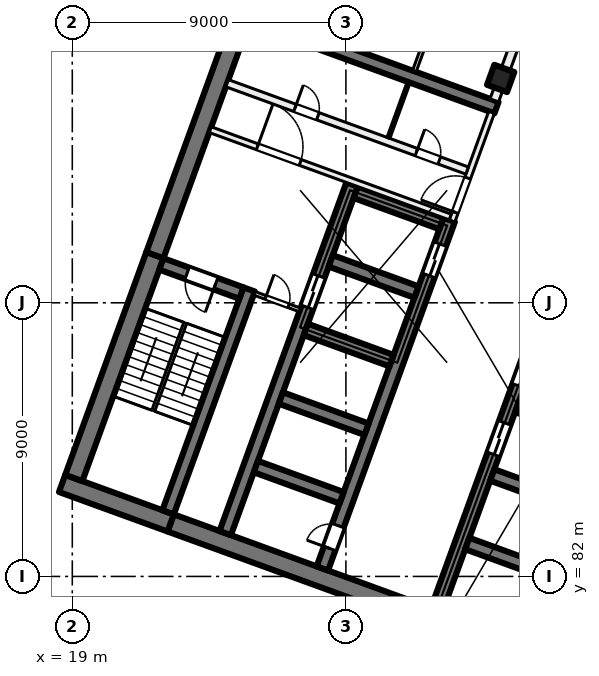
"""IFC4 building model, lengths in metres.
Left out: names, types, materials, properties, quantities, classifications, styles, units other than length and angle.
Written with IfcOpenShell. Run it as: python <this file> out.ifc"""

import sys

from ifc_helpers import new_model, si_unit, direction, frame, frame_2d, origin, origin_2d, place, context, subcontext, project, spatial, rectangle, extrude, element, fill, save


model = new_model("IFC4")
c1 = context("Model", 3, precision=1e-05, world=origin(), true_north=direction((0.0, 1.0)))
c2 = subcontext(c1, "Body", "Model", "MODEL_VIEW")
j1 = project(units=[si_unit("LENGTHUNIT", "METRE"), si_unit("PLANEANGLEUNIT", "RADIAN")], contexts=[c1])
p1 = place(None, origin())
s1 = spatial("IfcSite", under=j1, at=p1, CompositionType="ELEMENT")
p2 = place(p1, origin())
s2 = spatial("IfcBuilding", under=s1, at=p2, CompositionType="ELEMENT")
p3 = place(p2, frame((0.0, 0.0, 27.5)))
s3 = spatial("IfcBuildingStorey", under=s2, at=p3, CompositionType="ELEMENT", Elevation=27.5)
p4 = place(p3, frame((33.091, 98.379, 0.0), z_axis=(0.0, 0.0, 1.0), x_axis=(-0.342020143326, -0.939692620786, 0.0)))
e1 = element("IfcColumn", 1, at=p4, inside=s3, PredefinedType="COLUMN", context=c2, shape_type="SweptSolid", body=[
    extrude(rectangle(XDim=0.7, YDim=0.7, at=origin_2d()), origin(), (0.0, 0.0, 1.0), 4.0),
])
p5 = place(p3, frame((35.767, 78.835, 0.0), z_axis=(0.0, 0.0, 1.0), x_axis=(-0.939692894512, 0.342019391267, 0.0)))
e2 = element("IfcWall", 2, at=p5, inside=s3, PredefinedType="SHEAR", context=c2, shape_type="SweptSolid", body=[
    extrude(rectangle(XDim=14.4, YDim=0.6, at=frame_2d((7.2, 0.0))), origin(), (0.0, 0.0, 1.0), 4.0),
])
p6 = place(p3, frame((22.236, 83.76, 0.0), z_axis=(0.0, 0.0, 1.0), x_axis=(-0.939680822529, 0.342052557032, 0.0)))
e3 = element("IfcWall", 3, at=p6, inside=s3, PredefinedType="SHEAR", context=c2, shape_type="SweptSolid", body=[
    extrude(rectangle(XDim=3.8, YDim=0.6, at=frame_2d((1.9, 0.0))), origin(), (0.0, 0.0, 1.0), 4.0),
])
p7 = place(p3, frame((19.05, 85.239, 0.0), z_axis=(0.0, 0.0, 1.0), x_axis=(0.342016982193, 0.939693771338, 0.0)))
e4 = element("IfcWall", 4, at=p7, inside=s3, PredefinedType="SHEAR", context=c2, shape_type="SweptSolid", body=[
    extrude(rectangle(XDim=7.8, YDim=0.6, at=frame_2d((3.9, 0.0))), origin(), (0.0, 0.0, 1.0), 4.0),
])
p8 = place(p3, frame((21.717, 92.568, 0.0), z_axis=(0.0, 0.0, 1.0), x_axis=(0.342016162452, 0.939694069696, 0.0)))
e5 = element("IfcWall", 5, at=p8, inside=s3, PredefinedType="SHEAR", context=c2, shape_type="SweptSolid", body=[
    extrude(rectangle(XDim=8.9, YDim=0.6, at=frame_2d((4.45, 0.0))), origin(), (0.0, 0.0, 1.0), 4.0),
])
p9 = place(p3, frame((22.15, 84.11, 0.0), z_axis=(0.0, 0.0, 1.0), x_axis=(0.342016982193, 0.939693771338, 0.0)))
e6 = element("IfcWall", 6, at=p9, inside=s3, PredefinedType="SHEAR", context=c2, shape_type="SweptSolid", body=[
    extrude(rectangle(XDim=7.8, YDim=0.4, at=frame_2d((3.9, 0.0))), origin(), (0.0, 0.0, 1.0), 4.0),
])
p10 = place(p3, frame((24.562, 91.32, 0.0), z_axis=(0.0, 0.0, 1.0), x_axis=(-0.939717030584, 0.341953070509, 0.0)))
e7 = element("IfcWall", 7, at=p10, inside=s3, PredefinedType="SHEAR", context=c2, shape_type="SweptSolid", body=[
    extrude(rectangle(XDim=2.8, YDim=0.4, at=frame_2d((1.4, 0.0))), origin(), (0.0, 0.0, 1.0), 4.0),
])
p11 = place(p10, frame((0.9, 0.0, 0.0)))
e8 = element("IfcOpeningElement", 8, at=p11, cuts=e7, PredefinedType="OPENING", context=c2, shape_type="SweptSolid", body=[
    extrude(rectangle(XDim=1.0, YDim=2.1, at=frame_2d((0.5, 1.05))), frame((0.0, 0.21, 0.0), z_axis=(0.0, -1.0, 0.0), x_axis=(1.0, 0.0, 0.0)), (0.0, 0.0, 1.0), 0.42),
])
p12 = place(p3, frame((30.984, 80.895, 0.0), z_axis=(0.0, 0.0, 1.0), x_axis=(0.342021021735, 0.939692301071, 0.0)))
e9 = element("IfcWall", 9, at=p12, inside=s3, PredefinedType="SHEAR", context=c2, shape_type="SweptSolid", body=[
    extrude(rectangle(XDim=12.2, YDim=0.4, at=frame_2d((6.1, 0.0))), origin(), (0.0, 0.0, 1.0), 4.0),
])
p13 = place(p12, frame((5.45, 0.0, 0.0)))
e10 = element("IfcOpeningElement", 10, at=p13, cuts=e9, PredefinedType="OPENING", context=c2, shape_type="SweptSolid", body=[
    extrude(rectangle(XDim=1.1, YDim=2.1, at=frame_2d((0.55, 1.05))), frame((0.0, 0.21, 0.0), z_axis=(0.0, -1.0, 0.0), x_axis=(1.0, 0.0, 0.0)), (0.0, 0.0, 1.0), 0.42),
])
p14 = place(p12, frame((7.85, 0.0, 0.0)))
e11 = element("IfcOpeningElement", 11, at=p14, cuts=e9, PredefinedType="OPENING", context=c2, shape_type="SweptSolid", body=[
    extrude(rectangle(XDim=1.1, YDim=2.1, at=frame_2d((0.55, 1.05))), frame((0.0, 0.21, 0.0), z_axis=(0.0, -1.0, 0.0), x_axis=(1.0, 0.0, 0.0)), (0.0, 0.0, 1.0), 0.42),
])
p15 = place(p12, frame((10.25, 0.0, 0.0)))
e12 = element("IfcOpeningElement", 12, at=p15, cuts=e9, PredefinedType="OPENING", context=c2, shape_type="SweptSolid", body=[
    extrude(rectangle(XDim=1.1, YDim=2.1, at=frame_2d((0.55, 1.05))), frame((0.0, 0.21, 0.0), z_axis=(0.0, -1.0, 0.0), x_axis=(1.0, 0.0, 0.0)), (0.0, 0.0, 1.0), 0.42),
])
for number, where, z_axis, x_axis in (
    (13, (34.812, 82.056, 0.0), (0.0, 0.0, 1.0), (-0.94, 0.342, 0.0)),
    (14, (35.632, 84.311, 0.0), (0.0, 0.0, 1.0), (-0.94, 0.342, 0.0)),
    (15, (36.453, 86.566, 0.0), (0.0, 0.0, 1.0), (-0.94, 0.342, 0.0)),
):
    element("IfcWall", number, at=place(p3, frame(where, z_axis=z_axis, x_axis=x_axis)), inside=s3, PredefinedType="SHEAR", context=c2, shape_type="SweptSolid", body=[
        extrude(rectangle(XDim=3.0, YDim=0.4, at=frame_2d((1.5, 0.0))), origin(), (0.0, 0.0, 1.0), 4.0),
    ])
p16 = place(p3, frame((27.225, 82.263, 0.0), z_axis=(0.0, 0.0, 1.0), x_axis=(0.342014590177, 0.939694641948, 0.0)))
e16 = element("IfcWall", 16, at=p16, inside=s3, PredefinedType="SHEAR", context=c2, shape_type="SweptSolid", body=[
    extrude(rectangle(XDim=12.2, YDim=0.4, at=frame_2d((6.1, 0.0))), origin(), (0.0, 0.0, 1.0), 4.0),
])
p17 = place(p16, frame((10.25, 0.0, 0.0)))
e17 = element("IfcOpeningElement", 17, at=p17, cuts=e16, PredefinedType="OPENING", context=c2, shape_type="SweptSolid", body=[
    extrude(rectangle(XDim=1.1, YDim=2.1, at=frame_2d((0.55, 1.05))), frame((0.0, 0.21, 0.0), z_axis=(0.0, -1.0, 0.0), x_axis=(1.0, 0.0, 0.0)), (0.0, 0.0, 1.0), 0.42),
])
p18 = place(p16, frame((0.7, 0.0, 0.0)))
e18 = element("IfcOpeningElement", 18, at=p18, cuts=e16, PredefinedType="OPENING", context=c2, shape_type="SweptSolid", body=[
    extrude(rectangle(XDim=0.8, YDim=2.1, at=frame_2d((0.4, 1.05))), frame((0.0, 0.21, 0.0), z_axis=(0.0, -1.0, 0.0), x_axis=(1.0, 0.0, 0.0)), (0.0, 0.0, 1.0), 0.42),
])
p19 = place(p3, frame((24.03, 83.426, 0.0), z_axis=(0.0, 0.0, 1.0), x_axis=(0.342014590177, 0.939694641948, 0.0)))
e19 = element("IfcWall", 19, at=p19, inside=s3, PredefinedType="SHEAR", context=c2, shape_type="SweptSolid", body=[
    extrude(rectangle(XDim=12.2, YDim=0.4, at=frame_2d((6.1, 0.0))), origin(), (0.0, 0.0, 1.0), 4.0),
])
p20 = place(p19, frame((7.9, 0.0, 0.0)))
e20 = element("IfcOpeningElement", 20, at=p20, cuts=e19, PredefinedType="OPENING", context=c2, shape_type="SweptSolid", body=[
    extrude(rectangle(XDim=1.1, YDim=2.1, at=frame_2d((0.55, 1.05))), frame((0.0, 0.21, 0.0), z_axis=(0.0, -1.0, 0.0), x_axis=(1.0, 0.0, 0.0)), (0.0, 0.0, 1.0), 0.42),
])
p21 = place(p3, frame((27.858, 84.587, 0.0), z_axis=(0.0, 0.0, 1.0), x_axis=(-0.939686455819, 0.342037080957, 0.0)))
e21 = element("IfcWall", 21, at=p21, inside=s3, PredefinedType="SHEAR", context=c2, shape_type="SweptSolid", body=[
    extrude(rectangle(XDim=3.0, YDim=0.4, at=frame_2d((1.5, 0.0))), origin(), (0.0, 0.0, 1.0), 4.0),
])
p22 = place(p3, frame((28.678, 86.842, 0.0), z_axis=(0.0, 0.0, 1.0), x_axis=(-0.939676934218, 0.342063238742, 0.0)))
e22 = element("IfcWall", 22, at=p22, inside=s3, PredefinedType="SHEAR", context=c2, shape_type="SweptSolid", body=[
    extrude(rectangle(XDim=3.0, YDim=0.4, at=frame_2d((1.5, 0.0))), origin(), (0.0, 0.0, 1.0), 4.0),
])
for number, where, z_axis, x_axis in (
    (23, (29.5, 89.097, 0.0), (0.0, 0.0, 1.0), (-0.94, 0.342, 0.0)),
    (24, (30.32, 91.353, 0.0), (0.0, 0.0, 1.0), (-0.94, 0.342, 0.0)),
    (25, (31.141, 93.608, 0.0), (0.0, 0.0, 1.0), (-0.94, 0.342, 0.0)),
):
    element("IfcWall", number, at=place(p3, frame(where, z_axis=z_axis, x_axis=x_axis)), inside=s3, PredefinedType="SHEAR", context=c2, shape_type="SweptSolid", body=[
        extrude(rectangle(XDim=3.0, YDim=0.4, at=frame_2d((1.5, 0.0))), origin(), (0.0, 0.0, 1.0), 4.0),
    ])
p23 = place(p3, frame((32.953, 97.418, 0.0), z_axis=(0.0, 0.0, 1.0), x_axis=(-0.93969060187, 0.342025690201, 0.0)))
e26 = element("IfcWall", 26, at=p23, inside=s3, PredefinedType="SHEAR", context=c2, shape_type="SweptSolid", body=[
    extrude(rectangle(XDim=8.6, YDim=0.4, at=frame_2d((4.3, 0.0))), origin(), (0.0, 0.0, 1.0), 4.0),
])
p24 = place(p3, frame((31.491, 93.693, 0.0), z_axis=(0.0, 0.0, 1.0), x_axis=(0.341995824804, 0.939701471648, 0.0)))
e27 = element("IfcWall", 27, at=p24, inside=s3, PredefinedType="PARTITIONING", context=c2, shape_type="SweptSolid", body=[
    extrude(rectangle(XDim=3.8, YDim=0.2, at=frame_2d((1.9, 0.0))), origin(), (0.0, 0.0, 1.0), 3.625),
])
p25 = place(p24, frame((0.3, 0.0, 0.0)))
e28 = element("IfcOpeningElement", 28, at=p25, cuts=e27, PredefinedType="OPENING", context=c2, shape_type="SweptSolid", body=[
    extrude(rectangle(XDim=1.2, YDim=2.1, at=frame_2d((0.6, 1.05))), frame((0.0, 0.11, 0.0), z_axis=(0.0, -1.0, 0.0), x_axis=(1.0, 0.0, 0.0)), (0.0, 0.0, 1.0), 0.22),
])
p26 = place(p3, frame((23.538, 96.694, 0.0), z_axis=(0.0, 0.0, 1.0), x_axis=(0.939691552312, -0.342023078919, 0.0)))
e29 = element("IfcWall", 29, at=p26, inside=s3, PredefinedType="PARTITIONING", context=c2, shape_type="SweptSolid", body=[
    extrude(rectangle(XDim=8.4, YDim=0.2, at=frame_2d((4.2, 0.0))), origin(), (0.0, 0.0, 1.0), 3.625),
])
p27 = place(p26, frame((1.65, 0.0, 0.0)))
e30 = element("IfcOpeningElement", 30, at=p27, cuts=e29, PredefinedType="OPENING", context=c2, shape_type="SweptSolid", body=[
    extrude(rectangle(XDim=1.5, YDim=2.1, at=frame_2d((0.75, 1.05))), frame((0.0, 0.11, 0.0), z_axis=(0.0, -1.0, 0.0), x_axis=(1.0, 0.0, 0.0)), (0.0, 0.0, 1.0), 0.22),
])
p28 = place(p3, frame((24.094, 98.221, 0.0), z_axis=(0.0, 0.0, 1.0), x_axis=(0.939691552312, -0.342023078919, 0.0)))
e31 = element("IfcWall", 31, at=p28, inside=s3, PredefinedType="PARTITIONING", context=c2, shape_type="SweptSolid", body=[
    extrude(rectangle(XDim=8.4, YDim=0.25, at=frame_2d((4.2, 0.0))), origin(), (0.0, 0.0, 1.0), 3.625),
])
p29 = place(p28, frame((6.625, 0.0, 0.0)))
e32 = element("IfcOpeningElement", 32, at=p29, cuts=e31, PredefinedType="OPENING", context=c2, shape_type="SweptSolid", body=[
    extrude(rectangle(XDim=0.8, YDim=2.1, at=frame_2d((0.4, 1.05))), frame((0.0, 0.135, 0.0), z_axis=(0.0, -1.0, 0.0), x_axis=(1.0, 0.0, 0.0)), (0.0, 0.0, 1.0), 0.27),
])
p30 = place(p28, frame((2.375, 0.0, 0.0)))
e33 = element("IfcOpeningElement", 33, at=p30, cuts=e31, PredefinedType="OPENING", context=c2, shape_type="SweptSolid", body=[
    extrude(rectangle(XDim=0.8, YDim=2.1, at=frame_2d((0.4, 1.05))), frame((0.0, 0.135, 0.0), z_axis=(0.0, -1.0, 0.0), x_axis=(1.0, 0.0, 0.0)), (0.0, 0.0, 1.0), 0.27),
])
p31 = place(p3, frame((24.985, 91.312, 0.0), z_axis=(0.0, 0.0, 1.0), x_axis=(0.939708740826, -0.341975850632, 0.0)))
e34 = element("IfcWall", 34, at=p31, inside=s3, PredefinedType="PARTITIONING", context=c2, shape_type="SweptSolid", body=[
    extrude(rectangle(XDim=1.6, YDim=0.125, at=frame_2d((0.8, 0.0))), origin(), (0.0, 0.0, 1.0), 3.625),
])
p32 = place(p31, frame((0.4, 0.0, 0.0)))
e35 = element("IfcOpeningElement", 35, at=p32, cuts=e34, PredefinedType="OPENING", context=c2, shape_type="SweptSolid", body=[
    extrude(rectangle(XDim=0.8, YDim=2.1, at=frame_2d((0.4, 1.05))), frame((0.0, 0.073, 0.0), z_axis=(0.0, -1.0, 0.0), x_axis=(1.0, 0.0, 0.0)), (0.0, 0.0, 1.0), 0.145),
])
p33 = place(p3, frame((29.399, 96.424, 0.0), z_axis=(0.0, 0.0, 1.0), x_axis=(0.341913947243, 0.939731266204, 0.0)))
e36 = element("IfcWall", 36, at=p33, inside=s3, PredefinedType="PARTITIONING", context=c2, shape_type="SweptSolid", body=[
    extrude(rectangle(XDim=1.95, YDim=0.1, at=frame_2d((0.975, 0.0))), origin(), (0.0, 0.0, 1.0), 3.625),
])
p34 = place(p3, frame((30.25, 98.615, 0.0), z_axis=(0.0, 0.0, 1.0), x_axis=(0.341998018937, 0.93970067311, 0.0)))
e37 = element("IfcWall", 37, at=p34, inside=s3, PredefinedType="PARTITIONING", context=c2, shape_type="SweptSolid", body=[
    extrude(rectangle(XDim=9.687, YDim=0.125, at=frame_2d((4.844, 0.0))), origin(), (0.0, 0.0, 1.0), 3.625),
])
p35 = place(p34, frame((7.078, 0.0, 0.0)))
e38 = element("IfcOpeningElement", 38, at=p35, cuts=e37, PredefinedType="OPENING", context=c2, shape_type="SweptSolid", body=[
    extrude(rectangle(XDim=0.8, YDim=2.1, at=frame_2d((0.4, 1.05))), frame((0.0, 0.073, 0.0), z_axis=(0.0, -1.0, 0.0), x_axis=(1.0, 0.0, 0.0)), (0.0, 0.0, 1.0), 0.145),
])
p36 = place(p34, frame((3.848, 0.0, 0.0)))
e39 = element("IfcOpeningElement", 39, at=p36, cuts=e37, PredefinedType="OPENING", context=c2, shape_type="SweptSolid", body=[
    extrude(rectangle(XDim=0.8, YDim=2.1, at=frame_2d((0.4, 1.05))), frame((0.0, 0.073, 0.0), z_axis=(0.0, -1.0, 0.0), x_axis=(1.0, 0.0, 0.0)), (0.0, 0.0, 1.0), 0.145),
])
p37 = place(p3, frame((32.881, 97.657, 0.0), z_axis=(0.0, 0.0, 1.0), x_axis=(0.342017360004, 0.939693633828, 0.0)))
e40 = element("IfcWall", 40, at=p37, inside=s3, PredefinedType="PARTITIONING", context=c2, shape_type="SweptSolid", body=[
    extrude(rectangle(XDim=34.516, YDim=0.3, at=frame_2d((17.258, 0.0))), origin(), (0.0, 0.0, 1.0), 3.625),
])
p38 = place(p37, frame((6.0, 0.0, 0.0)))
e41 = element("IfcOpeningElement", 41, at=p38, cuts=e40, PredefinedType="OPENING", context=c2, shape_type="SweptSolid", body=[
    extrude(rectangle(XDim=1.0, YDim=2.1, at=frame_2d((0.5, 1.05))), frame((0.0, 0.16, 0.0), z_axis=(0.0, -1.0, 0.0), x_axis=(1.0, 0.0, 0.0)), (0.0, 0.0, 1.0), 0.32),
])
p39 = place(p37, frame((19.85, 0.0, 0.0)))
e42 = element("IfcOpeningElement", 42, at=p39, cuts=e40, PredefinedType="OPENING", context=c2, shape_type="SweptSolid", body=[
    extrude(rectangle(XDim=1.8, YDim=2.1, at=frame_2d((0.9, 1.05))), frame((0.0, 0.16, 0.0), z_axis=(0.0, -1.0, 0.0), x_axis=(1.0, 0.0, 0.0)), (0.0, 0.0, 1.0), 0.32),
])
p40 = place(p17, origin())
e43 = element("IfcDoor", 43, at=p40, inside=s3, OperationType="DOUBLE_DOOR_SLIDING", PredefinedType="DOOR", context=c2, shape_type="SweptSolid", body=[
    extrude(rectangle(XDim=1.1, YDim=2.1, at=frame_2d((0.55, 1.05))), frame((0.0, 0.025, 0.0), z_axis=(0.0, -1.0, 0.0), x_axis=(1.0, 0.0, 0.0)), (0.0, 0.0, 1.0), 0.05),
])
fill(e17, e43)
p41 = place(p13, origin())
e44 = element("IfcDoor", 44, at=p41, inside=s3, OperationType="DOUBLE_DOOR_SLIDING", PredefinedType="DOOR", context=c2, shape_type="SweptSolid", body=[
    extrude(rectangle(XDim=1.1, YDim=2.1, at=frame_2d((0.55, 1.05))), frame((0.0, 0.025, 0.0), z_axis=(0.0, -1.0, 0.0), x_axis=(1.0, 0.0, 0.0)), (0.0, 0.0, 1.0), 0.05),
])
fill(e10, e44)
p42 = place(p14, origin())
e45 = element("IfcDoor", 45, at=p42, inside=s3, OperationType="DOUBLE_DOOR_SLIDING", PredefinedType="DOOR", context=c2, shape_type="SweptSolid", body=[
    extrude(rectangle(XDim=1.1, YDim=2.1, at=frame_2d((0.55, 1.05))), frame((0.0, 0.025, 0.0), z_axis=(0.0, -1.0, 0.0), x_axis=(1.0, 0.0, 0.0)), (0.0, 0.0, 1.0), 0.05),
])
fill(e11, e45)
p43 = place(p18, origin())
e46 = element("IfcDoor", 46, at=p43, inside=s3, OperationType="SINGLE_SWING_LEFT", PredefinedType="DOOR", context=c2, shape_type="SweptSolid", body=[
    extrude(rectangle(XDim=0.8, YDim=2.1, at=frame_2d((0.4, 1.05))), frame((0.0, 0.025, 0.0), z_axis=(0.0, -1.0, 0.0), x_axis=(1.0, 0.0, 0.0)), (0.0, 0.0, 1.0), 0.05),
])
fill(e18, e46)
p44 = place(p25, origin())
e47 = element("IfcDoor", 47, at=p44, inside=s3, OperationType="DOUBLE_DOOR_SINGLE_SWING", PredefinedType="DOOR", context=c2, shape_type="SweptSolid", body=[
    extrude(rectangle(XDim=1.2, YDim=2.1, at=frame_2d((0.6, 1.05))), frame((0.0, 0.025, 0.0), z_axis=(0.0, -1.0, 0.0), x_axis=(1.0, 0.0, 0.0)), (0.0, 0.0, 1.0), 0.05),
])
fill(e28, e47)
p45 = place(p27, origin())
e48 = element("IfcDoor", 48, at=p45, inside=s3, OperationType="DOUBLE_DOOR_SINGLE_SWING", PredefinedType="DOOR", context=c2, shape_type="SweptSolid", body=[
    extrude(rectangle(XDim=1.5, YDim=2.1, at=frame_2d((0.75, 1.05))), frame((0.0, 0.025, 0.0), z_axis=(0.0, -1.0, 0.0), x_axis=(1.0, 0.0, 0.0)), (0.0, 0.0, 1.0), 0.05),
])
fill(e30, e48)
p46 = place(p11, origin())
e49 = element("IfcDoor", 49, at=p46, inside=s3, OperationType="SINGLE_SWING_LEFT", PredefinedType="DOOR", context=c2, shape_type="SweptSolid", body=[
    extrude(rectangle(XDim=1.0, YDim=2.1, at=frame_2d((0.5, 1.05))), frame((0.0, 0.025, 0.0), z_axis=(0.0, -1.0, 0.0), x_axis=(1.0, 0.0, 0.0)), (0.0, 0.0, 1.0), 0.05),
])
fill(e8, e49)
p47 = place(p32, origin())
e50 = element("IfcDoor", 50, at=p47, inside=s3, OperationType="SINGLE_SWING_RIGHT", PredefinedType="DOOR", context=c2, shape_type="SweptSolid", body=[
    extrude(rectangle(XDim=0.8, YDim=2.1, at=frame_2d((0.4, 1.05))), frame((0.0, 0.025, 0.0), z_axis=(0.0, -1.0, 0.0), x_axis=(1.0, 0.0, 0.0)), (0.0, 0.0, 1.0), 0.05),
])
fill(e35, e50)
p48 = place(p29, origin())
e51 = element("IfcDoor", 51, at=p48, inside=s3, OperationType="SINGLE_SWING_LEFT", PredefinedType="DOOR", context=c2, shape_type="SweptSolid", body=[
    extrude(rectangle(XDim=0.8, YDim=2.1, at=frame_2d((0.4, 1.05))), frame((0.0, 0.025, 0.0), z_axis=(0.0, -1.0, 0.0), x_axis=(1.0, 0.0, 0.0)), (0.0, 0.0, 1.0), 0.05),
])
fill(e32, e51)
p49 = place(p30, origin())
e52 = element("IfcDoor", 52, at=p49, inside=s3, OperationType="SINGLE_SWING_RIGHT", PredefinedType="DOOR", context=c2, shape_type="SweptSolid", body=[
    extrude(rectangle(XDim=0.8, YDim=2.1, at=frame_2d((0.4, 1.05))), frame((0.0, 0.025, 0.0), z_axis=(0.0, -1.0, 0.0), x_axis=(1.0, 0.0, 0.0)), (0.0, 0.0, 1.0), 0.05),
])
fill(e33, e52)
p50 = place(p20, origin())
e53 = element("IfcDoor", 53, at=p50, inside=s3, OperationType="DOUBLE_DOOR_SLIDING", PredefinedType="DOOR", context=c2, shape_type="SweptSolid", body=[
    extrude(rectangle(XDim=1.1, YDim=2.1, at=frame_2d((0.55, 1.05))), frame((0.0, 0.025, 0.0), z_axis=(0.0, -1.0, 0.0), x_axis=(1.0, 0.0, 0.0)), (0.0, 0.0, 1.0), 0.05),
])
fill(e20, e53)
save(model, sys.argv[1])
